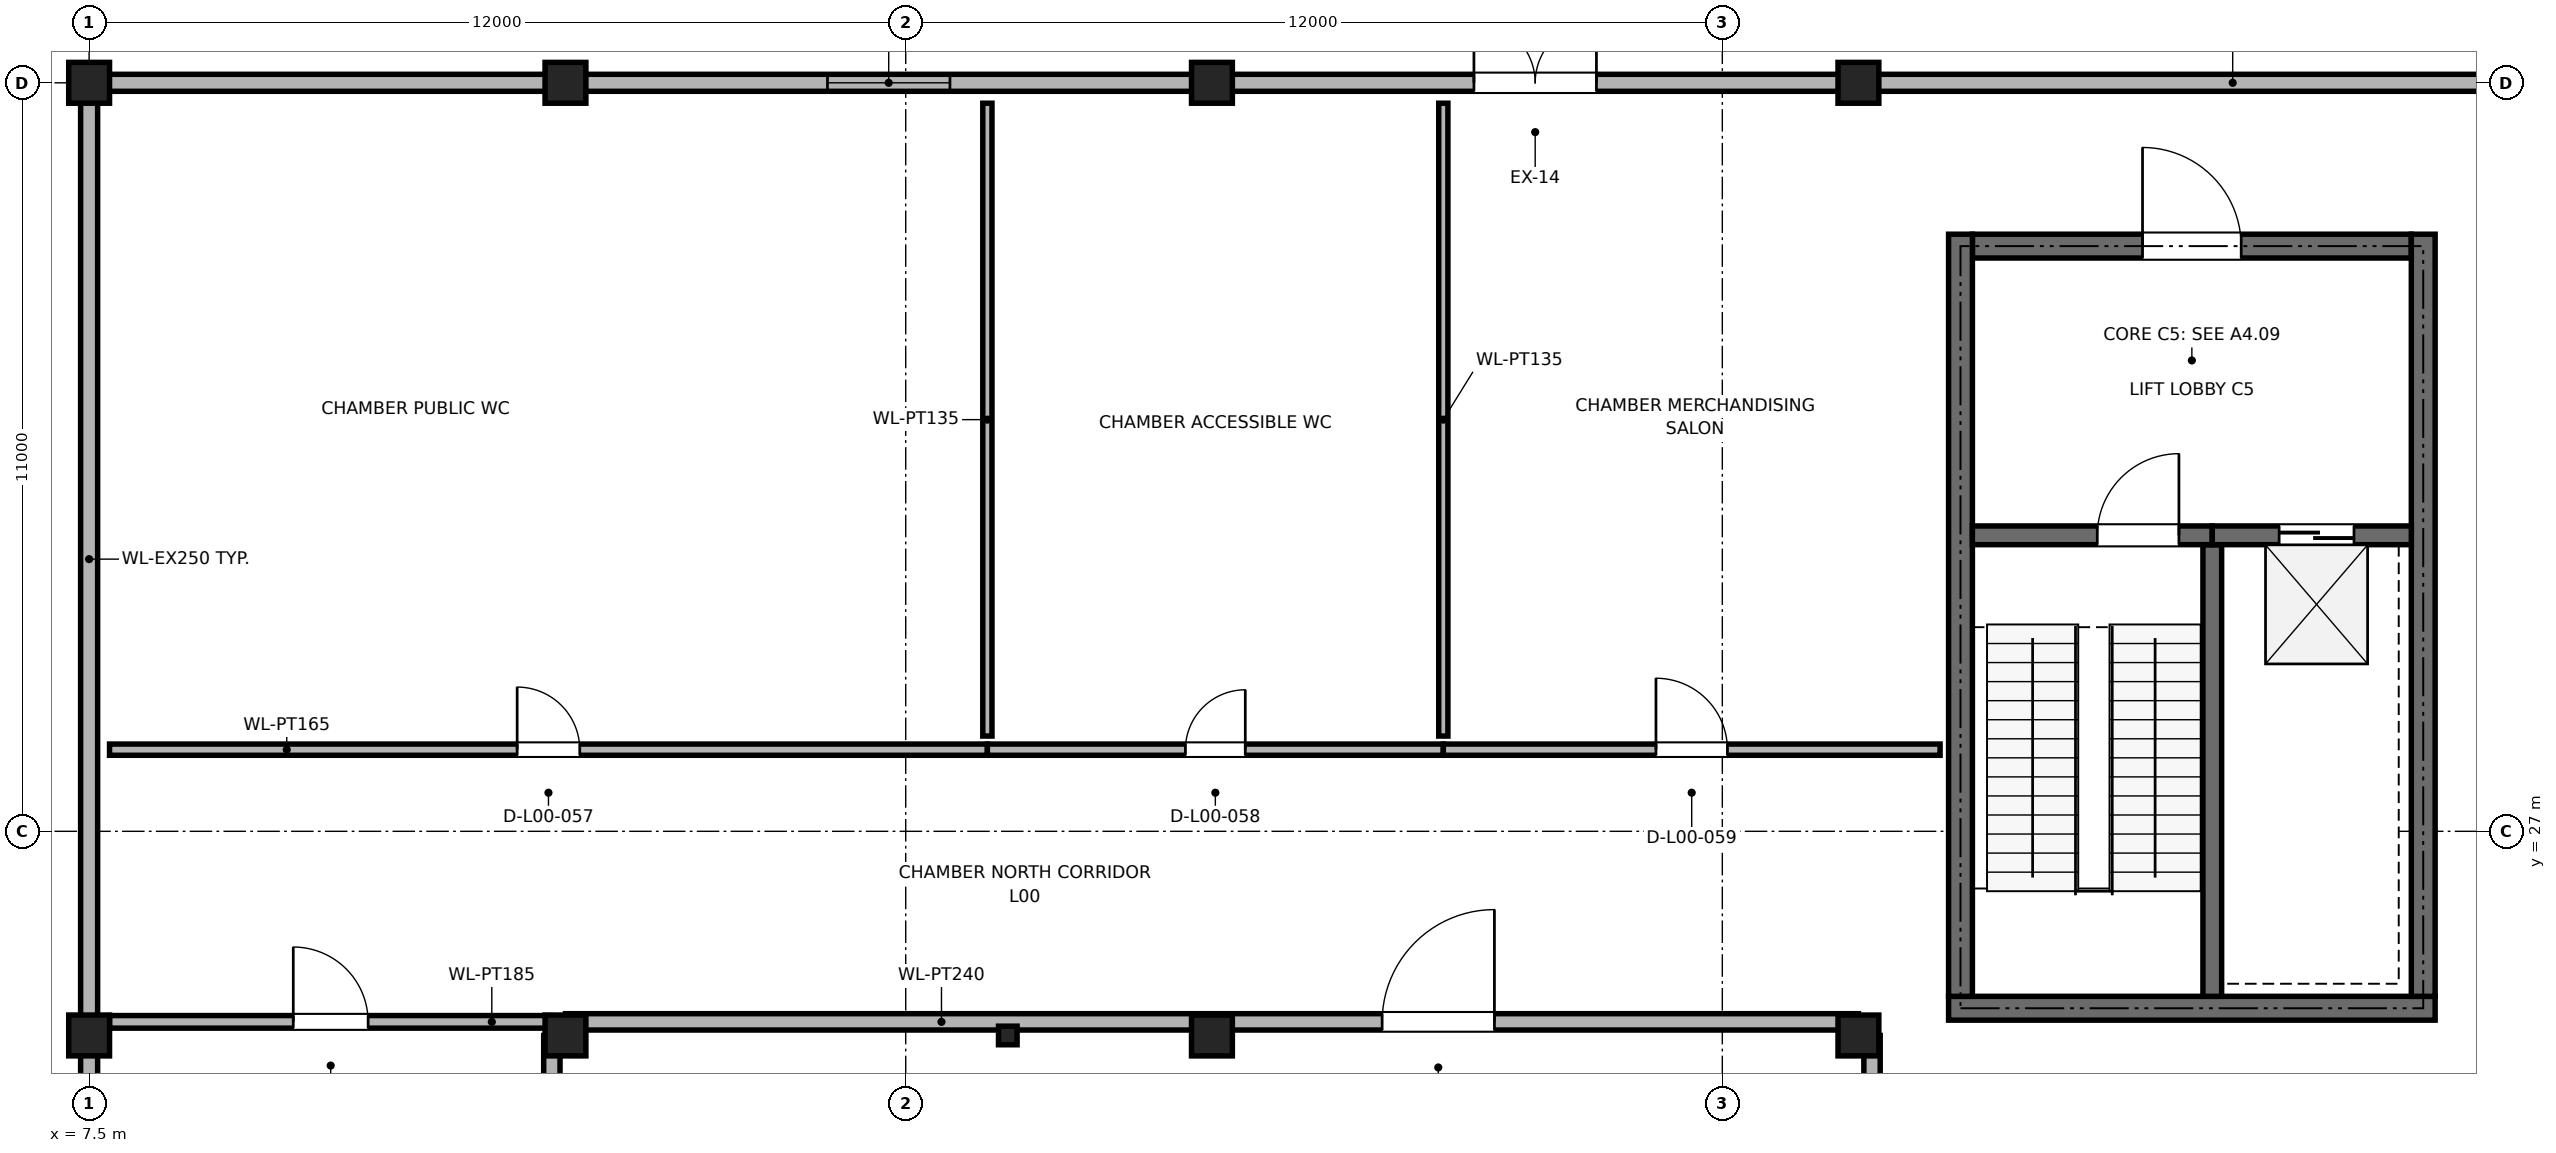
"""IFC4 building model, lengths in metres.
Left out: names, types, materials, properties, quantities, classifications, styles, units other than length and angle.
Written with IfcOpenShell. Run it as: python <this file> out.ifc"""

import sys

from ifc_helpers import new_model, si_unit, direction, frame, frame_2d, origin, origin_2d, place, context, subcontext, project, spatial, rectangle, hollow_circle, extrude, element, fill, save


model = new_model("IFC4")
c1 = context("Model", 3, precision=1e-05, world=origin(), true_north=direction((0.0, 1.0)))
c2 = subcontext(c1, "Body", "Model", "MODEL_VIEW")
j1 = project(units=[si_unit("LENGTHUNIT", "METRE"), si_unit("PLANEANGLEUNIT", "RADIAN")], contexts=[c1])
p1 = place(None, origin())
s1 = spatial("IfcSite", under=j1, at=p1, CompositionType="ELEMENT")
p2 = place(p1, origin())
s2 = spatial("IfcBuilding", under=s1, at=p2, CompositionType="ELEMENT")
p3 = place(p2, origin())
s3 = spatial("IfcBuildingStorey", under=s2, at=p3, CompositionType="ELEMENT", Elevation=0.0)
for number, where, z_axis, x_axis in (
    (1, (33.5, 38.0, 0.0), (0.0, 0.0, 1.0), (1.0, 0.0, 0.0)),
    (2, (24.0, 38.0, 0.0), (0.0, 0.0, 1.0), (1.0, 0.0, 0.0)),
    (3, (14.5, 38.0, 0.0), (0.0, 0.0, 1.0), (1.0, 0.0, 0.0)),
    (4, (7.5, 38.0, 0.0), (0.0, 0.0, 1.0), (1.0, 0.0, 0.0)),
    (5, (7.5, 24.0, 0.0), (0.0, 0.0, 1.0), (1.0, 0.0, 0.0)),
    (6, (14.5, 24.0, 0.0), (0.0, 0.0, 1.0), (1.0, 0.0, 0.0)),
    (7, (24.0, 24.0, 0.0), (0.0, 0.0, 1.0), (1.0, 0.0, 0.0)),
    (8, (33.5, 24.0, 0.0), (0.0, 0.0, 1.0), (1.0, 0.0, 0.0)),
):
    element("IfcColumn", number, at=place(p3, frame(where, z_axis=z_axis, x_axis=x_axis)), inside=s3, PredefinedType="COLUMN", context=c2, shape_type="SweptSolid", body=[
        extrude(rectangle(XDim=0.6, YDim=0.6, at=origin_2d()), origin(), (0.0, 0.0, 1.0), 4.8),
    ])
p4 = place(p3, frame((21.0, 24.0, 0.0), z_axis=(0.0, 0.0, 1.0), x_axis=(1.0, 0.0, 0.0)))
e9 = element("IfcColumn", 9, at=p4, inside=s3, PredefinedType="COLUMN", context=c2, shape_type="SweptSolid", body=[
    extrude(hollow_circle(Radius=0.136, WallThickness=0.016, at=origin_2d()), origin(), (0.0, 0.0, 1.0), 4.8),
])
p5 = place(p3, frame((33.52, 38.0, 0.0), z_axis=(0.0, 0.0, 1.0), x_axis=(1.0, 0.0, 0.0)))
e10 = element("IfcWall", 10, at=p5, inside=s3, PredefinedType="SOLIDWALL", context=c2, shape_type="SweptSolid", body=[
    extrude(rectangle(XDim=10.96, YDim=0.25, at=frame_2d((5.48, 0.0))), origin(), (0.0, 0.0, 1.0), 4.058),
])
p6 = place(p3, frame((24.02, 38.0, 0.0), z_axis=(0.0, 0.0, 1.0), x_axis=(1.0, 0.0, 0.0)))
e11 = element("IfcWall", 11, at=p6, inside=s3, PredefinedType="SOLIDWALL", context=c2, shape_type="SweptSolid", body=[
    extrude(rectangle(XDim=9.46, YDim=0.25, at=frame_2d((4.73, 0.0))), origin(), (0.0, 0.0, 1.0), 4.058),
])
p7 = place(p6, frame((3.83, 0.0, 0.0)))
e12 = element("IfcOpeningElement", 12, at=p7, cuts=e11, PredefinedType="OPENING", context=c2, shape_type="SweptSolid", body=[
    extrude(rectangle(XDim=1.8, YDim=2.25, at=frame_2d((0.9, 1.125))), frame((0.0, 0.135, 0.0), z_axis=(0.0, -1.0, 0.0), x_axis=(1.0, 0.0, 0.0)), (0.0, 0.0, 1.0), 0.27),
])
p8 = place(p3, frame((14.52, 38.0, 0.0), z_axis=(0.0, 0.0, 1.0), x_axis=(1.0, 0.0, 0.0)))
e13 = element("IfcWall", 13, at=p8, inside=s3, PredefinedType="SOLIDWALL", context=c2, shape_type="SweptSolid", body=[
    extrude(rectangle(XDim=9.46, YDim=0.25, at=frame_2d((4.73, 0.0))), origin(), (0.0, 0.0, 1.0), 4.058),
])
p9 = place(p8, frame((3.83, 0.0, 0.85)))
e14 = element("IfcOpeningElement", 14, at=p9, cuts=e13, PredefinedType="OPENING", context=c2, shape_type="SweptSolid", body=[
    extrude(rectangle(XDim=1.8, YDim=1.7, at=frame_2d((0.9, 0.85))), frame((0.0, 0.135, 0.0), z_axis=(0.0, -1.0, 0.0), x_axis=(1.0, 0.0, 0.0)), (0.0, 0.0, 1.0), 0.27),
])
p10 = place(p3, frame((7.52, 38.0, 0.0), z_axis=(0.0, 0.0, 1.0), x_axis=(1.0, 0.0, 0.0)))
e15 = element("IfcWall", 15, at=p10, inside=s3, PredefinedType="SOLIDWALL", context=c2, shape_type="SweptSolid", body=[
    extrude(rectangle(XDim=6.96, YDim=0.25, at=frame_2d((3.48, 0.0))), origin(), (0.0, 0.0, 1.0), 4.058),
])
p11 = place(p3, frame((7.5, 24.02, 0.0), z_axis=(0.0, 0.0, 1.0), x_axis=(0.0, 1.0, 0.0)))
e16 = element("IfcWall", 16, at=p11, inside=s3, PredefinedType="SOLIDWALL", context=c2, shape_type="SweptSolid", body=[
    extrude(rectangle(XDim=13.96, YDim=0.25, at=frame_2d((6.98, 0.0))), origin(), (0.0, 0.0, 1.0), 4.058),
])
p12 = place(p3, frame((7.5, 11.52, 0.0), z_axis=(0.0, 0.0, 1.0), x_axis=(0.0, 1.0, 0.0)))
e17 = element("IfcWall", 17, at=p12, inside=s3, PredefinedType="SOLIDWALL", context=c2, shape_type="SweptSolid", body=[
    extrude(rectangle(XDim=12.46, YDim=0.25, at=frame_2d((6.23, 0.0))), origin(), (0.0, 0.0, 1.0), 4.058),
])
p13 = place(p12, frame((5.33, 0.0, 0.85)))
e18 = element("IfcOpeningElement", 18, at=p13, cuts=e17, PredefinedType="OPENING", context=c2, shape_type="SweptSolid", body=[
    extrude(rectangle(XDim=1.8, YDim=1.7, at=frame_2d((0.9, 0.85))), frame((0.0, 0.135, 0.0), z_axis=(0.0, -1.0, 0.0), x_axis=(1.0, 0.0, 0.0)), (0.0, 0.0, 1.0), 0.27),
])
p14 = place(p3, frame((34.825, 24.4, 0.0), z_axis=(0.0, 0.0, 1.0), x_axis=(1.0, 0.0, 0.0)))
e19 = element("IfcWall", 19, at=p14, inside=s3, PredefinedType="SHEAR", context=c2, shape_type="SweptSolid", body=[
    extrude(rectangle(XDim=7.15, YDim=0.35, at=frame_2d((3.575, 0.0))), origin(), (0.0, 0.0, 1.0), 4.52),
])
p15 = place(p3, frame((35.175, 35.6, 0.0), z_axis=(0.0, 0.0, 1.0), x_axis=(1.0, 0.0, 0.0)))
e20 = element("IfcWall", 20, at=p15, inside=s3, PredefinedType="SHEAR", context=c2, shape_type="SweptSolid", body=[
    extrude(rectangle(XDim=6.45, YDim=0.35, at=frame_2d((3.225, 0.0))), origin(), (0.0, 0.0, 1.0), 4.52),
])
p16 = place(p15, frame((2.5, 0.0, 0.0)))
e21 = element("IfcOpeningElement", 21, at=p16, cuts=e20, PredefinedType="OPENING", context=c2, shape_type="SweptSolid", body=[
    extrude(rectangle(XDim=1.45, YDim=2.2, at=frame_2d((0.725, 1.1))), frame((0.0, 0.185, 0.0), z_axis=(0.0, -1.0, 0.0), x_axis=(1.0, 0.0, 0.0)), (0.0, 0.0, 1.0), 0.37),
])
for number, where, z_axis, x_axis in (
    (22, (35.0, 24.575, 0.0), (0.0, 0.0, 1.0), (0.0, 1.0, 0.0)),
    (23, (41.8, 24.575, 0.0), (0.0, 0.0, 1.0), (0.0, 1.0, 0.0)),
):
    element("IfcWall", number, at=place(p3, frame(where, z_axis=z_axis, x_axis=x_axis)), inside=s3, PredefinedType="SHEAR", context=c2, shape_type="SweptSolid", body=[
        extrude(rectangle(XDim=11.2, YDim=0.35, at=frame_2d((5.6, 0.0))), origin(), (0.0, 0.0, 1.0), 4.52),
    ])
p17 = place(p3, frame((38.7, 24.575, 0.0), z_axis=(0.0, 0.0, 1.0), x_axis=(0.0, 1.0, 0.0)))
e24 = element("IfcWall", 24, at=p17, inside=s3, PredefinedType="SHEAR", context=c2, shape_type="SweptSolid", body=[
    extrude(rectangle(XDim=6.637, YDim=0.275, at=frame_2d((3.319, 0.0))), origin(), (0.0, 0.0, 1.0), 4.52),
])
p18 = place(p3, frame((35.175, 31.35, 0.0), z_axis=(0.0, 0.0, 1.0), x_axis=(1.0, 0.0, 0.0)))
e25 = element("IfcWall", 25, at=p18, inside=s3, PredefinedType="SHEAR", context=c2, shape_type="SweptSolid", body=[
    extrude(rectangle(XDim=3.525, YDim=0.275, at=frame_2d((1.762, 0.0))), origin(), (0.0, 0.0, 1.0), 4.52),
])
p19 = place(p18, frame((1.835, 0.0, 0.0)))
e26 = element("IfcOpeningElement", 26, at=p19, cuts=e25, PredefinedType="OPENING", context=c2, shape_type="SweptSolid", body=[
    extrude(rectangle(XDim=1.2, YDim=2.15, at=frame_2d((0.6, 1.075))), frame((0.0, 0.147, 0.0), z_axis=(0.0, -1.0, 0.0), x_axis=(1.0, 0.0, 0.0)), (0.0, 0.0, 1.0), 0.295),
])
p20 = place(p3, frame((38.7, 31.35, 0.0), z_axis=(0.0, 0.0, 1.0), x_axis=(1.0, 0.0, 0.0)))
e27 = element("IfcWall", 27, at=p20, inside=s3, PredefinedType="SHEAR", context=c2, shape_type="SweptSolid", body=[
    extrude(rectangle(XDim=2.925, YDim=0.275, at=frame_2d((1.462, 0.0))), origin(), (0.0, 0.0, 1.0), 4.52),
])
p21 = place(p20, frame((0.982, 0.0, 0.0)))
e28 = element("IfcOpeningElement", 28, at=p21, cuts=e27, PredefinedType="OPENING", context=c2, shape_type="SweptSolid", body=[
    extrude(rectangle(XDim=1.1, YDim=2.15, at=frame_2d((0.55, 1.075))), frame((0.0, 0.147, 0.0), z_axis=(0.0, -1.0, 0.0), x_axis=(1.0, 0.0, 0.0)), (0.0, 0.0, 1.0), 0.295),
])
p22 = place(p3, frame((14.3, 11.5, 0.0), z_axis=(0.0, 0.0, 1.0), x_axis=(0.0, 1.0, 0.0)))
e29 = element("IfcWall", 29, at=p22, inside=s3, PredefinedType="PARTITIONING", context=c2, shape_type="SweptSolid", body=[
    extrude(rectangle(XDim=12.5, YDim=0.24, at=frame_2d((6.25, 0.0))), origin(), (0.0, 0.0, 1.0), 4.06),
])
p23 = place(p22, frame((5.425, 0.0, 0.0)))
e30 = element("IfcOpeningElement", 30, at=p23, cuts=e29, PredefinedType="OPENING", context=c2, shape_type="SweptSolid", body=[
    extrude(rectangle(XDim=1.65, YDim=2.2, at=frame_2d((0.825, 1.1))), frame((0.0, 0.13, 0.0), z_axis=(0.0, -1.0, 0.0), x_axis=(1.0, 0.0, 0.0)), (0.0, 0.0, 1.0), 0.26),
])
p24 = place(p3, frame((33.7, 11.5, 0.0), z_axis=(0.0, 0.0, 1.0), x_axis=(0.0, 1.0, 0.0)))
e31 = element("IfcWall", 31, at=p24, inside=s3, PredefinedType="PARTITIONING", context=c2, shape_type="SweptSolid", body=[
    extrude(rectangle(XDim=12.5, YDim=0.24, at=frame_2d((6.25, 0.0))), origin(), (0.0, 0.0, 1.0), 4.06),
])
p25 = place(p24, frame((5.7, 0.0, 0.0)))
e32 = element("IfcOpeningElement", 32, at=p25, cuts=e31, PredefinedType="OPENING", context=c2, shape_type="SweptSolid", body=[
    extrude(rectangle(XDim=1.1, YDim=2.15, at=frame_2d((0.55, 1.075))), frame((0.0, 0.13, 0.0), z_axis=(0.0, -1.0, 0.0), x_axis=(1.0, 0.0, 0.0)), (0.0, 0.0, 1.0), 0.26),
])
p26 = place(p3, frame((7.8, 24.2, 0.0), z_axis=(0.0, 0.0, 1.0), x_axis=(1.0, 0.0, 0.0)))
e33 = element("IfcWall", 33, at=p26, inside=s3, PredefinedType="PARTITIONING", context=c2, shape_type="SweptSolid", body=[
    extrude(rectangle(XDim=6.5, YDim=0.185, at=frame_2d((3.25, 0.0))), origin(), (0.0, 0.0, 1.0), 4.06),
])
p27 = place(p26, frame((2.7, 0.0, 0.0)))
e34 = element("IfcOpeningElement", 34, at=p27, cuts=e33, PredefinedType="OPENING", context=c2, shape_type="SweptSolid", body=[
    extrude(rectangle(XDim=1.1, YDim=2.15, at=frame_2d((0.55, 1.075))), frame((0.0, 0.103, 0.0), z_axis=(0.0, -1.0, 0.0), x_axis=(1.0, 0.0, 0.0)), (0.0, 0.0, 1.0), 0.205),
])
p28 = place(p3, frame((14.5, 24.2, 0.0), z_axis=(0.0, 0.0, 1.0), x_axis=(1.0, 0.0, 0.0)))
e35 = element("IfcWall", 35, at=p28, inside=s3, PredefinedType="PARTITIONING", context=c2, shape_type="SweptSolid", body=[
    extrude(rectangle(XDim=19.0, YDim=0.24, at=frame_2d((9.5, 0.0))), origin(), (0.0, 0.0, 1.0), 4.06),
])
p29 = place(p28, frame((12.001, 0.0, 0.0)))
e36 = element("IfcOpeningElement", 36, at=p29, cuts=e35, PredefinedType="OPENING", context=c2, shape_type="SweptSolid", body=[
    extrude(rectangle(XDim=1.65, YDim=2.2, at=frame_2d((0.825, 1.1))), frame((0.0, 0.13, 0.0), z_axis=(0.0, -1.0, 0.0), x_axis=(1.0, 0.0, 0.0)), (0.0, 0.0, 1.0), 0.26),
])
p30 = place(p3, frame((7.8, 28.2, 0.0), z_axis=(0.0, 0.0, 1.0), x_axis=(1.0, 0.0, 0.0)))
e37 = element("IfcWall", 37, at=p30, inside=s3, PredefinedType="PARTITIONING", context=c2, shape_type="SweptSolid", body=[
    extrude(rectangle(XDim=12.9, YDim=0.165, at=frame_2d((6.45, 0.0))), origin(), (0.0, 0.0, 1.0), 4.06),
])
p31 = place(p30, frame((5.99, 0.0, 0.0)))
e38 = element("IfcOpeningElement", 38, at=p31, cuts=e37, PredefinedType="OPENING", context=c2, shape_type="SweptSolid", body=[
    extrude(rectangle(XDim=0.92, YDim=2.1, at=frame_2d((0.46, 1.05))), frame((0.0, 0.093, 0.0), z_axis=(0.0, -1.0, 0.0), x_axis=(1.0, 0.0, 0.0)), (0.0, 0.0, 1.0), 0.185),
])
p32 = place(p3, frame((20.7, 28.2, 0.0), z_axis=(0.0, 0.0, 1.0), x_axis=(1.0, 0.0, 0.0)))
e39 = element("IfcWall", 39, at=p32, inside=s3, PredefinedType="PARTITIONING", context=c2, shape_type="SweptSolid", body=[
    extrude(rectangle(XDim=6.7, YDim=0.165, at=frame_2d((3.35, 0.0))), origin(), (0.0, 0.0, 1.0), 4.06),
])
p33 = place(p32, frame((2.91, 0.0, 0.0)))
e40 = element("IfcOpeningElement", 40, at=p33, cuts=e39, PredefinedType="OPENING", context=c2, shape_type="SweptSolid", body=[
    extrude(rectangle(XDim=0.88, YDim=2.1, at=frame_2d((0.44, 1.05))), frame((0.0, 0.093, 0.0), z_axis=(0.0, -1.0, 0.0), x_axis=(1.0, 0.0, 0.0)), (0.0, 0.0, 1.0), 0.185),
])
p34 = place(p3, frame((27.4, 28.2, 0.0), z_axis=(0.0, 0.0, 1.0), x_axis=(1.0, 0.0, 0.0)))
e41 = element("IfcWall", 41, at=p34, inside=s3, PredefinedType="PARTITIONING", context=c2, shape_type="SweptSolid", body=[
    extrude(rectangle(XDim=7.3, YDim=0.165, at=frame_2d((3.65, 0.0))), origin(), (0.0, 0.0, 1.0), 4.06),
])
p35 = place(p34, frame((3.125, 0.0, 0.0)))
e42 = element("IfcOpeningElement", 42, at=p35, cuts=e41, PredefinedType="OPENING", context=c2, shape_type="SweptSolid", body=[
    extrude(rectangle(XDim=1.05, YDim=2.15, at=frame_2d((0.525, 1.075))), frame((0.0, 0.093, 0.0), z_axis=(0.0, -1.0, 0.0), x_axis=(1.0, 0.0, 0.0)), (0.0, 0.0, 1.0), 0.185),
])
for number, where, z_axis, x_axis in (
    (43, (20.7, 28.4, 0.0), (0.0, 0.0, 1.0), (0.0, 1.0, 0.0)),
    (44, (27.4, 28.4, 0.0), (0.0, 0.0, 1.0), (0.0, 1.0, 0.0)),
):
    element("IfcWall", number, at=place(p3, frame(where, z_axis=z_axis, x_axis=x_axis)), inside=s3, PredefinedType="PARTITIONING", context=c2, shape_type="SweptSolid", body=[
        extrude(rectangle(XDim=9.3, YDim=0.135, at=frame_2d((4.65, 0.0))), origin(), (0.0, 0.0, 1.0), 4.27),
    ])
p36 = place(p7, origin())
e45 = element("IfcDoor", 45, at=p36, inside=s3, OperationType="DOUBLE_DOOR_SINGLE_SWING", PredefinedType="DOOR", context=c2, shape_type="SweptSolid", body=[
    extrude(rectangle(XDim=1.8, YDim=2.25, at=frame_2d((0.9, 1.125))), frame((0.0, 0.025, 0.0), z_axis=(0.0, -1.0, 0.0), x_axis=(1.0, 0.0, 0.0)), (0.0, 0.0, 1.0), 0.05),
])
fill(e12, e45)
p37 = place(p9, origin())
e46 = element("IfcWindow", 46, at=p37, inside=s3, PartitioningType="SINGLE_PANEL", PredefinedType="WINDOW", context=c2, shape_type="SweptSolid", body=[
    extrude(rectangle(XDim=1.8, YDim=1.7, at=frame_2d((0.9, 0.85))), frame((0.0, 0.03, 0.0), z_axis=(0.0, -1.0, 0.0), x_axis=(1.0, 0.0, 0.0)), (0.0, 0.0, 1.0), 0.06),
])
fill(e14, e46)
p38 = place(p19, origin())
e47 = element("IfcDoor", 47, at=p38, inside=s3, OperationType="SINGLE_SWING_RIGHT", PredefinedType="DOOR", context=c2, shape_type="SweptSolid", body=[
    extrude(rectangle(XDim=1.2, YDim=2.15, at=frame_2d((0.6, 1.075))), frame((0.0, 0.025, 0.0), z_axis=(0.0, -1.0, 0.0), x_axis=(1.0, 0.0, 0.0)), (0.0, 0.0, 1.0), 0.05),
])
fill(e26, e47)
p39 = place(p21, origin())
e48 = element("IfcDoor", 48, at=p39, inside=s3, OperationType="DOUBLE_DOOR_SLIDING", PredefinedType="DOOR", context=c2, shape_type="SweptSolid", body=[
    extrude(rectangle(XDim=1.1, YDim=2.15, at=frame_2d((0.55, 1.075))), frame((0.0, 0.025, 0.0), z_axis=(0.0, -1.0, 0.0), x_axis=(1.0, 0.0, 0.0)), (0.0, 0.0, 1.0), 0.05),
])
fill(e28, e48)
p40 = place(p16, origin())
e49 = element("IfcDoor", 49, at=p40, inside=s3, OperationType="SINGLE_SWING_LEFT", PredefinedType="DOOR", context=c2, shape_type="SweptSolid", body=[
    extrude(rectangle(XDim=1.45, YDim=2.2, at=frame_2d((0.725, 1.1))), frame((0.0, 0.025, 0.0), z_axis=(0.0, -1.0, 0.0), x_axis=(1.0, 0.0, 0.0)), (0.0, 0.0, 1.0), 0.05),
])
fill(e21, e49)
p41 = place(p27, origin())
e50 = element("IfcDoor", 50, at=p41, inside=s3, OperationType="SINGLE_SWING_LEFT", PredefinedType="DOOR", context=c2, shape_type="SweptSolid", body=[
    extrude(rectangle(XDim=1.1, YDim=2.15, at=frame_2d((0.55, 1.075))), frame((0.0, 0.025, 0.0), z_axis=(0.0, -1.0, 0.0), x_axis=(1.0, 0.0, 0.0)), (0.0, 0.0, 1.0), 0.05),
])
fill(e34, e50)
p42 = place(p29, origin())
e51 = element("IfcDoor", 51, at=p42, inside=s3, OperationType="SINGLE_SWING_RIGHT", PredefinedType="DOOR", context=c2, shape_type="SweptSolid", body=[
    extrude(rectangle(XDim=1.65, YDim=2.2, at=frame_2d((0.825, 1.1))), frame((0.0, 0.025, 0.0), z_axis=(0.0, -1.0, 0.0), x_axis=(1.0, 0.0, 0.0)), (0.0, 0.0, 1.0), 0.05),
])
fill(e36, e51)
p43 = place(p31, origin())
e52 = element("IfcDoor", 52, at=p43, inside=s3, OperationType="SINGLE_SWING_LEFT", PredefinedType="DOOR", context=c2, shape_type="SweptSolid", body=[
    extrude(rectangle(XDim=0.92, YDim=2.1, at=frame_2d((0.46, 1.05))), frame((0.0, 0.025, 0.0), z_axis=(0.0, -1.0, 0.0), x_axis=(1.0, 0.0, 0.0)), (0.0, 0.0, 1.0), 0.05),
])
fill(e38, e52)
p44 = place(p33, origin())
e53 = element("IfcDoor", 53, at=p44, inside=s3, OperationType="SINGLE_SWING_RIGHT", PredefinedType="DOOR", context=c2, shape_type="SweptSolid", body=[
    extrude(rectangle(XDim=0.88, YDim=2.1, at=frame_2d((0.44, 1.05))), frame((0.0, 0.025, 0.0), z_axis=(0.0, -1.0, 0.0), x_axis=(1.0, 0.0, 0.0)), (0.0, 0.0, 1.0), 0.05),
])
fill(e40, e53)
p45 = place(p35, origin())
e54 = element("IfcDoor", 54, at=p45, inside=s3, OperationType="SINGLE_SWING_LEFT", PredefinedType="DOOR", context=c2, shape_type="SweptSolid", body=[
    extrude(rectangle(XDim=1.05, YDim=2.15, at=frame_2d((0.525, 1.075))), frame((0.0, 0.025, 0.0), z_axis=(0.0, -1.0, 0.0), x_axis=(1.0, 0.0, 0.0)), (0.0, 0.0, 1.0), 0.05),
])
fill(e42, e54)
save(model, sys.argv[1])
